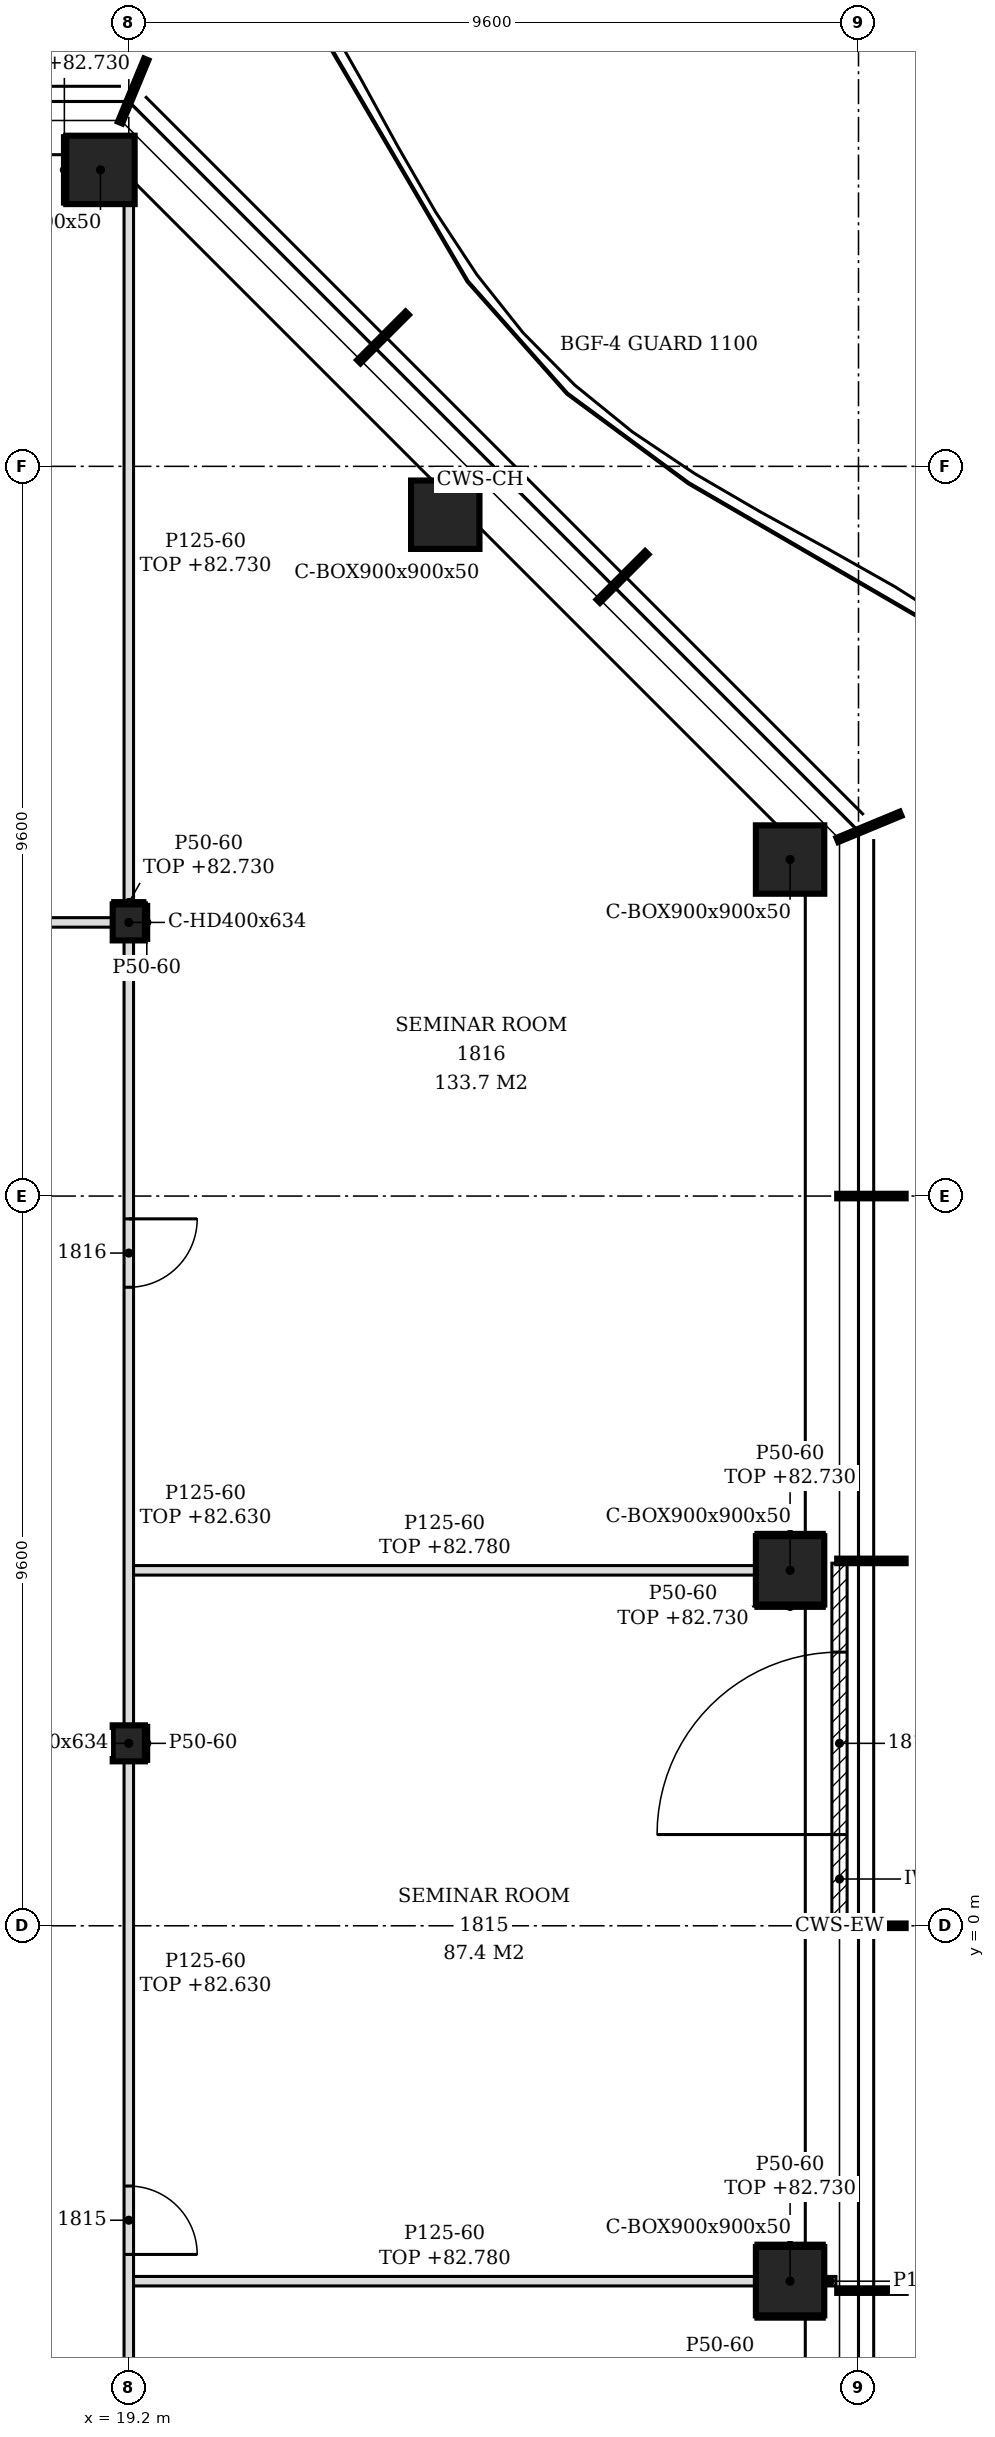
"""IFC4 building model, lengths in metres.
Left out: names, types, materials, properties, quantities, classifications, styles, units other than length and angle.
Written with IfcOpenShell. Run it as: python <this file> out.ifc"""

import sys

from ifc_helpers import new_model, si_unit, direction, frame, frame_2d, origin, origin_2d, place, context, subcontext, project, spatial, polyline, rectangle, hollow_rectangle, i_section, outline, extrude, element, fill, save


model = new_model("IFC4")
c1 = context("Model", 3, precision=1e-05, world=origin(), true_north=direction((0.0, 1.0)))
c2 = subcontext(c1, "Body", "Model", "MODEL_VIEW")
j1 = project(units=[si_unit("LENGTHUNIT", "METRE"), si_unit("PLANEANGLEUNIT", "RADIAN")], contexts=[c1])
p1 = place(None, origin())
s1 = spatial("IfcSite", under=j1, at=p1, CompositionType="ELEMENT")
p2 = place(p1, origin())
s2 = spatial("IfcBuilding", under=s1, at=p2, CompositionType="ELEMENT")
p3 = place(p2, frame((0.0, 0.0, 79.8)))
s3 = spatial("IfcBuildingStorey", under=s2, at=p3, CompositionType="ELEMENT", Elevation=79.8)
for number, where, z_axis, x_axis in (
    (1, (27.9, -4.676, -0.15), (0.0, 0.0, 1.0), (1.0, 0.0, 0.0)),
    (2, (27.9, 4.676, -0.15), (0.0, 0.0, 1.0), (1.0, 0.0, 0.0)),
    (3, (27.9, 14.027, -0.15), (0.0, 0.0, 1.0), (1.0, 0.0, 0.0)),
    (4, (23.364, 18.564, -0.15), (0.0, 0.0, 1.0), (1.0, 0.0, 0.0)),
    (5, (18.827, 23.1, -0.15), (0.0, 0.0, 1.0), (1.0, 0.0, 0.0)),
):
    element("IfcColumn", number, at=place(p3, frame(where, z_axis=z_axis, x_axis=x_axis)), inside=s3, PredefinedType="COLUMN", context=c2, shape_type="SweptSolid", body=[
        extrude(hollow_rectangle(XDim=0.9, YDim=0.9, WallThickness=0.05, at=origin_2d()), origin(), (0.0, 0.0, 1.0), 3.6),
    ])
for number, where, z_axis, x_axis in (
    (6, (19.2, 2.4, -0.15), (0.0, 0.0, 1.0), (1.0, 0.0, 0.0)),
    (7, (19.2, 13.2, -0.15), (0.0, 0.0, 1.0), (1.0, 0.0, 0.0)),
):
    element("IfcColumn", number, at=place(p3, frame(where, z_axis=z_axis, x_axis=x_axis)), inside=s3, PredefinedType="COLUMN", context=c2, shape_type="SweptSolid", body=[
        extrude(i_section(OverallWidth=0.424, OverallDepth=0.474, WebThickness=0.048, FlangeThickness=0.077, FilletRadius=0.015, at=origin_2d()), origin(), (0.0, 0.0, 1.0), 3.6),
    ])
p4 = place(p3, frame((28.55, 0.03, 0.0), z_axis=(0.0, 0.0, 1.0), x_axis=(0.0, 1.0, 0.0)))
e8 = element("IfcWall", 8, at=p4, inside=s3, PredefinedType="NOTDEFINED", context=c2, shape_type="SweptSolid", body=[
    extrude(rectangle(XDim=4.74, YDim=0.2, at=frame_2d((2.37, 0.0))), origin(), (0.0, 0.0, 1.0), 3.45),
])
p5 = place(p4, frame((1.17, 0.0, 0.0)))
e9 = element("IfcOpeningElement", 9, at=p5, cuts=e8, PredefinedType="OPENING", context=c2, shape_type="SweptSolid", body=[
    extrude(rectangle(XDim=2.4, YDim=2.4, at=frame_2d((1.2, 1.2))), frame((0.0, 0.11, 0.0), z_axis=(0.0, -1.0, 0.0), x_axis=(1.0, 0.0, 0.0)), (0.0, 0.0, 1.0), 0.22),
])
p6 = place(p3, frame((19.2, -8.163, 0.0), z_axis=(0.0, 0.0, 1.0), x_axis=(0.0, 1.0, 0.0)))
e10 = element("IfcWall", 10, at=p6, inside=s3, PredefinedType="PARTITIONING", context=c2, shape_type="SweptSolid", body=[
    extrude(rectangle(XDim=10.326, YDim=0.125, at=frame_2d((5.163, 0.0))), origin(), (0.0, 0.0, 1.0), 2.83),
])
p7 = place(p6, frame((3.839, 0.0, 0.0)))
e11 = element("IfcOpeningElement", 11, at=p7, cuts=e10, PredefinedType="OPENING", context=c2, shape_type="SweptSolid", body=[
    extrude(rectangle(XDim=0.9, YDim=2.1, at=frame_2d((0.45, 1.05))), frame((0.0, 0.073, 0.0), z_axis=(0.0, -1.0, 0.0), x_axis=(1.0, 0.0, 0.0)), (0.0, 0.0, 1.0), 0.145),
])
p8 = place(p3, frame((19.262, -4.676, 0.0), z_axis=(0.0, 0.0, 1.0), x_axis=(1.0, 0.0, 0.0)))
e12 = element("IfcWall", 12, at=p8, inside=s3, PredefinedType="PARTITIONING", context=c2, shape_type="SweptSolid", body=[
    extrude(outline(polyline([(0.0, 0.0), (8.188, 0.0), (8.188, 2.98), (0.087, 2.98), (0.085, 2.83), (0.0, 2.83), (0.0, 0.0)])), frame((0.0, 0.062, 0.0), z_axis=(0.0, -1.0, 0.0), x_axis=(1.0, 0.0, 0.0)), (0.0, 0.0, 1.0), 0.125),
])
p9 = place(p3, frame((28.35, -4.676, 0.0), z_axis=(0.0, 0.0, 1.0), x_axis=(1.0, 0.0, 0.0)))
e13 = element("IfcWall", 13, at=p9, inside=s3, PredefinedType="PARTITIONING", context=c2, shape_type="SweptSolid", body=[
    extrude(rectangle(XDim=0.153, YDim=0.125, at=frame_2d((0.076, 0.0))), origin(), (0.0, 0.0, 1.0), 3.45),
])
p10 = place(p3, frame((19.2, 2.637, 0.0), z_axis=(0.0, 0.0, 1.0), x_axis=(0.0, 1.0, 0.0)))
e14 = element("IfcWall", 14, at=p10, inside=s3, PredefinedType="PARTITIONING", context=c2, shape_type="SweptSolid", body=[
    extrude(rectangle(XDim=10.326, YDim=0.125, at=frame_2d((5.163, 0.0))), origin(), (0.0, 0.0, 1.0), 2.83),
])
p11 = place(p10, frame((5.763, 0.0, 0.0)))
e15 = element("IfcOpeningElement", 15, at=p11, cuts=e14, PredefinedType="OPENING", context=c2, shape_type="SweptSolid", body=[
    extrude(rectangle(XDim=0.9, YDim=2.1, at=frame_2d((0.45, 1.05))), frame((0.0, 0.073, 0.0), z_axis=(0.0, -1.0, 0.0), x_axis=(1.0, 0.0, 0.0)), (0.0, 0.0, 1.0), 0.145),
])
p12 = place(p3, frame((19.262, 4.676, 0.0), z_axis=(0.0, 0.0, 1.0), x_axis=(1.0, 0.0, 0.0)))
e16 = element("IfcWall", 16, at=p12, inside=s3, PredefinedType="PARTITIONING", context=c2, shape_type="SweptSolid", body=[
    extrude(outline(polyline([(0.0, 0.0), (8.188, 0.0), (8.188, 2.98), (0.087, 2.98), (0.085, 2.83), (0.0, 2.83), (0.0, 0.0)])), frame((0.0, 0.062, 0.0), z_axis=(0.0, -1.0, 0.0), x_axis=(1.0, 0.0, 0.0)), (0.0, 0.0, 1.0), 0.125),
])
p13 = place(p3, frame((7.412, 13.2, 0.0), z_axis=(0.0, 0.0, 1.0), x_axis=(1.0, 0.0, 0.0)))
e17 = element("IfcWall", 17, at=p13, inside=s3, PredefinedType="PARTITIONING", context=c2, shape_type="SweptSolid", body=[
    extrude(rectangle(XDim=11.576, YDim=0.125, at=frame_2d((5.788, 0.0))), origin(), (0.0, 0.0, 1.0), 2.83),
])
p14 = place(p13, frame((1.588, 0.0, 0.0)))
e18 = element("IfcOpeningElement", 18, at=p14, cuts=e17, PredefinedType="OPENING", context=c2, shape_type="SweptSolid", body=[
    extrude(rectangle(XDim=0.9, YDim=2.1, at=frame_2d((0.45, 1.05))), frame((0.0, 0.073, 0.0), z_axis=(0.0, -1.0, 0.0), x_axis=(1.0, 0.0, 0.0)), (0.0, 0.0, 1.0), 0.145),
])
p15 = place(p3, frame((19.2, 13.437, 0.0), z_axis=(0.0, 0.0, 1.0), x_axis=(0.0, 1.0, 0.0)))
e19 = element("IfcWall", 19, at=p15, inside=s3, PredefinedType="PARTITIONING", context=c2, shape_type="SweptSolid", body=[
    extrude(outline(polyline([(0.0, 0.0), (9.213, 0.0), (9.213, 2.63), (8.733, 2.63), (8.731, 2.93), (0.0, 2.93), (0.0, 0.0)])), frame((0.0, 0.062, 0.0), z_axis=(0.0, -1.0, 0.0), x_axis=(1.0, 0.0, 0.0)), (0.0, 0.0, 1.0), 0.125),
])
p16 = place(p3, frame((19.437, 2.163, 0.0), z_axis=(0.0, 0.0, 1.0), x_axis=(0.0, 1.0, 0.0)))
e20 = element("IfcWall", 20, at=p16, inside=s3, PredefinedType="PARTITIONING", context=c2, shape_type="SweptSolid", body=[
    extrude(rectangle(XDim=0.474, YDim=0.05, at=frame_2d((0.237, 0.0))), origin(), (0.0, 0.0, 1.0), 3.45),
])
p17 = place(p3, frame((19.437, 12.963, 0.0), z_axis=(0.0, 0.0, 1.0), x_axis=(0.0, 1.0, 0.0)))
e21 = element("IfcWall", 21, at=p17, inside=s3, PredefinedType="PARTITIONING", context=c2, shape_type="SweptSolid", body=[
    extrude(rectangle(XDim=0.474, YDim=0.05, at=frame_2d((0.237, 0.0))), origin(), (0.0, 0.0, 1.0), 3.45),
])
for number, where, z_axis, x_axis in (
    (22, (27.45, -4.201, 0.0), (0.0, 0.0, 1.0), (1.0, 0.0, 0.0)),
    (23, (27.45, -5.151, 0.0), (0.0, 0.0, 1.0), (1.0, 0.0, 0.0)),
    (24, (27.45, 5.151, 0.0), (0.0, 0.0, 1.0), (1.0, 0.0, 0.0)),
    (25, (27.45, 4.201, 0.0), (0.0, 0.0, 1.0), (1.0, 0.0, 0.0)),
):
    element("IfcWall", number, at=place(p3, frame(where, z_axis=z_axis, x_axis=x_axis)), inside=s3, PredefinedType="PARTITIONING", context=c2, shape_type="SweptSolid", body=[
        extrude(rectangle(XDim=0.9, YDim=0.05, at=frame_2d((0.45, 0.0))), origin(), (0.0, 0.0, 1.0), 2.93),
    ])
p18 = place(p3, frame((18.988, 13.462, 0.0), z_axis=(0.0, 0.0, 1.0), x_axis=(1.0, 0.0, 0.0)))
e26 = element("IfcWall", 26, at=p18, inside=s3, PredefinedType="PARTITIONING", context=c2, shape_type="SweptSolid", body=[
    extrude(rectangle(XDim=0.424, YDim=0.05, at=frame_2d((0.212, 0.0))), origin(), (0.0, 0.0, 1.0), 2.93),
])
p19 = place(p3, frame((18.352, 22.65, 0.0), z_axis=(0.0, 0.0, 1.0), x_axis=(0.0, 1.0, 0.0)))
e27 = element("IfcWall", 27, at=p19, inside=s3, PredefinedType="PARTITIONING", context=c2, shape_type="SweptSolid", body=[
    extrude(rectangle(XDim=0.9, YDim=0.05, at=frame_2d((0.45, 0.0))), origin(), (0.0, 0.0, 1.0), 2.93),
])
p20 = place(p5, origin())
e28 = element("IfcDoor", 28, at=p20, inside=s3, OperationType="SINGLE_SWING_LEFT", PredefinedType="DOOR", context=c2, shape_type="SweptSolid", body=[
    extrude(rectangle(XDim=2.4, YDim=2.4, at=frame_2d((1.2, 1.2))), frame((0.0, 0.025, 0.0), z_axis=(0.0, -1.0, 0.0), x_axis=(1.0, 0.0, 0.0)), (0.0, 0.0, 1.0), 0.05),
])
fill(e9, e28)
p21 = place(p7, frame((0.9, 0.0, 0.0), z_axis=(0.0, 0.0, 1.0), x_axis=(-1.0, 0.0, 0.0)))
e29 = element("IfcDoor", 29, at=p21, inside=s3, OperationType="SINGLE_SWING_RIGHT", PredefinedType="DOOR", context=c2, shape_type="SweptSolid", body=[
    extrude(rectangle(XDim=0.9, YDim=2.1, at=frame_2d((0.45, 1.05))), frame((0.0, 0.025, 0.0), z_axis=(0.0, -1.0, 0.0), x_axis=(1.0, 0.0, 0.0)), (0.0, 0.0, 1.0), 0.05),
])
fill(e11, e29)
p22 = place(p11, frame((0.9, 0.0, 0.0), z_axis=(0.0, 0.0, 1.0), x_axis=(-1.0, 0.0, 0.0)))
e30 = element("IfcDoor", 30, at=p22, inside=s3, OperationType="SINGLE_SWING_LEFT", PredefinedType="DOOR", context=c2, shape_type="SweptSolid", body=[
    extrude(rectangle(XDim=0.9, YDim=2.1, at=frame_2d((0.45, 1.05))), frame((0.0, 0.025, 0.0), z_axis=(0.0, -1.0, 0.0), x_axis=(1.0, 0.0, 0.0)), (0.0, 0.0, 1.0), 0.05),
])
fill(e15, e30)
save(model, sys.argv[1])
